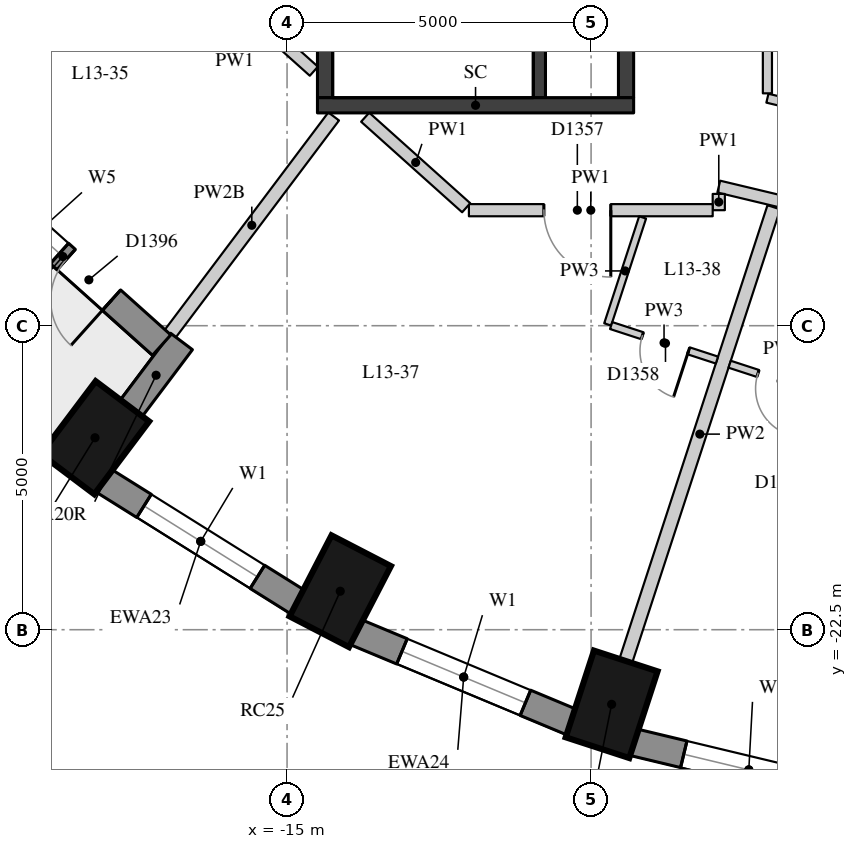
"""IFC4 building model, lengths in metres.
Left out: names, types, materials, properties, quantities, classifications, styles, units other than length and angle.
Written with IfcOpenShell. Run it as: python <this file> out.ifc"""

import sys

from ifc_helpers import new_model, si_unit, direction, frame, frame_2d, origin, origin_2d, place, context, subcontext, project, spatial, rectangle, extrude, element, fill, save


model = new_model("IFC4")
c1 = context("Model", 3, precision=1e-05, world=origin(), true_north=direction((0.0, 1.0)))
c2 = subcontext(c1, "Body", "Model", "MODEL_VIEW")
j1 = project(units=[si_unit("LENGTHUNIT", "METRE"), si_unit("PLANEANGLEUNIT", "RADIAN")], contexts=[c1])
p1 = place(None, origin())
s1 = spatial("IfcSite", under=j1, at=p1, CompositionType="ELEMENT")
p2 = place(p1, origin())
s2 = spatial("IfcBuilding", under=s1, at=p2, CompositionType="ELEMENT")
p3 = place(p2, frame((0.0, 0.0, 51.4)))
s3 = spatial("IfcBuildingStorey", under=s2, at=p3, CompositionType="ELEMENT", Elevation=51.4)
for number, where, z_axis, x_axis in (
    (1, (-18.159, -19.343, 0.0), (0.0, 0.0, 1.0), (-0.601, -0.799, 0.0)),
    (2, (-14.125, -21.867, 0.0), (0.0, 0.0, 1.0), (-0.46, -0.888, 0.0)),
    (3, (-9.662, -23.727, 0.0), (0.0, 0.0, 1.0), (-0.31, -0.951, 0.0)),
):
    element("IfcColumn", number, at=place(p3, frame(where, z_axis=z_axis, x_axis=x_axis)), inside=s3, PredefinedType="COLUMN", context=c2, shape_type="SweptSolid", body=[
        extrude(rectangle(XDim=1.5, YDim=1.1, at=origin_2d()), origin(), (0.0, 0.0, 1.0), 3.3),
    ])
p4 = place(p3, frame((-18.023, -20.044, 0.0), z_axis=(0.0, 0.0, 1.0), x_axis=(0.847635480093, -0.530579016629, 0.0)))
e4 = element("IfcWall", 4, at=p4, inside=s3, PredefinedType="SOLIDWALL", context=c2, shape_type="SweptSolid", body=[
    extrude(rectangle(XDim=3.782, YDim=0.45, at=frame_2d((1.891, 0.0))), origin(), (0.0, 0.0, 1.0), 3.02),
])
p5 = place(p4, frame((0.791, 0.0, 0.4)))
e5 = element("IfcOpeningElement", 5, at=p5, cuts=e4, PredefinedType="OPENING", context=c2, shape_type="SweptSolid", body=[
    extrude(rectangle(XDim=2.2, YDim=1.75, at=frame_2d((1.1, 0.875))), frame((0.0, 0.235, 0.0), z_axis=(0.0, -1.0, 0.0), x_axis=(1.0, 0.0, 0.0)), (0.0, 0.0, 1.0), 0.47),
])
p6 = place(p3, frame((-13.875, -22.537, 0.0), z_axis=(0.0, 0.0, 1.0), x_axis=(0.923031964282, -0.384723267966, 0.0)))
e6 = element("IfcWall", 6, at=p6, inside=s3, PredefinedType="SOLIDWALL", context=c2, shape_type="SweptSolid", body=[
    extrude(rectangle(XDim=3.856, YDim=0.45, at=frame_2d((1.928, 0.0))), origin(), (0.0, 0.0, 1.0), 3.02),
])
p7 = place(p6, frame((0.828, 0.0, 0.4)))
e7 = element("IfcOpeningElement", 7, at=p7, cuts=e6, PredefinedType="OPENING", context=c2, shape_type="SweptSolid", body=[
    extrude(rectangle(XDim=2.2, YDim=1.75, at=frame_2d((1.1, 0.875))), frame((0.0, 0.235, 0.0), z_axis=(0.0, -1.0, 0.0), x_axis=(1.0, 0.0, 0.0)), (0.0, 0.0, 1.0), 0.47),
])
p8 = place(p3, frame((-9.308, -24.35, 0.0), z_axis=(0.0, 0.0, 1.0), x_axis=(0.972496561493, -0.232917233979, 0.0)))
e8 = element("IfcWall", 8, at=p8, inside=s3, PredefinedType="SOLIDWALL", context=c2, shape_type="SweptSolid", body=[
    extrude(rectangle(XDim=3.911, YDim=0.45, at=frame_2d((1.956, 0.0))), origin(), (0.0, 0.0, 1.0), 3.02),
])
p9 = place(p8, frame((0.855, 0.0, 0.4)))
e9 = element("IfcOpeningElement", 9, at=p9, cuts=e8, PredefinedType="OPENING", context=c2, shape_type="SweptSolid", body=[
    extrude(rectangle(XDim=2.2, YDim=1.75, at=frame_2d((1.1, 0.875))), frame((0.0, 0.235, 0.0), z_axis=(0.0, -1.0, 0.0), x_axis=(1.0, 0.0, 0.0)), (0.0, 0.0, 1.0), 0.47),
])
p10 = place(p3, frame((-17.572, -18.871, 0.0), z_axis=(0.0, 0.0, 1.0), x_axis=(0.601262851241, 0.799051302306, 0.0)))
e10 = element("IfcWall", 10, at=p10, inside=s3, PredefinedType="SOLIDWALL", context=c2, shape_type="SweptSolid", body=[
    extrude(rectangle(XDim=1.391, YDim=0.45, at=frame_2d((0.696, 0.0))), origin(), (0.0, 0.0, 1.0), 2.57),
])
p11 = place(p3, frame((-20.313, -14.905, 0.0), z_axis=(0.0, 0.0, 1.0), x_axis=(0.744616407434, -0.667492626012, 0.0)))
e11 = element("IfcWall", 11, at=p11, inside=s3, PredefinedType="SOLIDWALL", context=c2, shape_type="SweptSolid", body=[
    extrude(rectangle(XDim=4.365, YDim=0.45, at=frame_2d((2.183, 0.0))), origin(), (0.0, 0.0, 1.0), 3.02),
])
p12 = place(p11, frame((1.108, 0.0, 0.4)))
e12 = element("IfcOpeningElement", 12, at=p12, cuts=e11, PredefinedType="OPENING", context=c2, shape_type="SweptSolid", body=[
    extrude(rectangle(XDim=1.0, YDim=1.75, at=frame_2d((0.5, 0.875))), frame((0.0, 0.235, 0.0), z_axis=(0.0, -1.0, 0.0), x_axis=(1.0, 0.0, 0.0)), (0.0, 0.0, 1.0), 0.47),
])
p13 = place(p11, frame((2.258, 0.0, 0.0)))
e13 = element("IfcOpeningElement", 13, at=p13, cuts=e11, PredefinedType="OPENING", context=c2, shape_type="SweptSolid", body=[
    extrude(rectangle(XDim=1.0, YDim=2.15, at=frame_2d((0.5, 1.075))), frame((0.0, 0.235, 0.0), z_axis=(0.0, -1.0, 0.0), x_axis=(1.0, 0.0, 0.0)), (0.0, 0.0, 1.0), 0.47),
])
p14 = place(p3, frame((-10.85, -13.75, 0.0), z_axis=(0.0, 0.0, 1.0), x_axis=(0.0, 1.0, 0.0)))
e14 = element("IfcWall", 14, at=p14, inside=s3, PredefinedType="SHEAR", context=c2, shape_type="SweptSolid", body=[
    extrude(rectangle(XDim=6.0, YDim=0.2, at=frame_2d((3.0, 0.0))), origin(), (0.0, 0.0, 1.0), 3.02),
])
p15 = place(p14, frame((4.4, 0.0, 0.0)))
e15 = element("IfcOpeningElement", 15, at=p15, cuts=e14, PredefinedType="OPENING", context=c2, shape_type="SweptSolid", body=[
    extrude(rectangle(XDim=1.5, YDim=2.1, at=frame_2d((0.75, 1.05))), frame((0.0, 0.11, 0.0), z_axis=(0.0, -1.0, 0.0), x_axis=(1.0, 0.0, 0.0)), (0.0, 0.0, 1.0), 0.22),
])
p16 = place(p3, frame((-14.375, -13.75, -0.28), z_axis=(0.0, 0.0, 1.0), x_axis=(0.0, 1.0, 0.0)))
e16 = element("IfcWall", 16, at=p16, inside=s3, PredefinedType="SHEAR", context=c2, shape_type="SweptSolid", body=[
    extrude(rectangle(XDim=6.0, YDim=0.25, at=frame_2d((3.0, 0.0))), origin(), (0.0, 0.0, 1.0), 3.3),
])
p17 = place(p3, frame((-9.425, -13.75, -0.28), z_axis=(0.0, 0.0, 1.0), x_axis=(0.0, 1.0, 0.0)))
e17 = element("IfcWall", 17, at=p17, inside=s3, PredefinedType="SHEAR", context=c2, shape_type="SweptSolid", body=[
    extrude(rectangle(XDim=6.0, YDim=0.25, at=frame_2d((3.0, 0.0))), origin(), (0.0, 0.0, 1.0), 3.3),
])
p18 = place(p17, frame((2.4, 0.0, 0.28)))
e18 = element("IfcOpeningElement", 18, at=p18, cuts=e17, PredefinedType="OPENING", context=c2, shape_type="SweptSolid", body=[
    extrude(rectangle(XDim=1.5, YDim=2.1, at=frame_2d((0.75, 1.05))), frame((0.0, 0.135, 0.0), z_axis=(0.0, -1.0, 0.0), x_axis=(1.0, 0.0, 0.0)), (0.0, 0.0, 1.0), 0.27),
])
p19 = place(p3, frame((-14.5, -13.875, -0.28), z_axis=(0.0, 0.0, 1.0), x_axis=(1.0, 0.0, 0.0)))
e19 = element("IfcWall", 19, at=p19, inside=s3, PredefinedType="SHEAR", context=c2, shape_type="SweptSolid", body=[
    extrude(rectangle(XDim=5.2, YDim=0.25, at=frame_2d((2.6, 0.0))), origin(), (0.0, 0.0, 1.0), 3.3),
])
p20 = place(p3, frame((-14.559, -13.314, 0.0), z_axis=(0.0, 0.0, 1.0), x_axis=(-0.744636171002, 0.667470578254, 0.0)))
e20 = element("IfcWall", 20, at=p20, inside=s3, PredefinedType="PARTITIONING", context=c2, shape_type="SweptSolid", body=[
    extrude(rectangle(XDim=2.069, YDim=0.2, at=frame_2d((1.035, 0.0))), origin(), (0.0, 0.0, 1.0), 3.02),
])
p21 = place(p3, frame((-0.098, -17.077, 0.0), z_axis=(0.0, 0.0, 1.0), x_axis=(-0.972607318404, 0.232454305588, 0.0)))
e21 = element("IfcWall", 21, at=p21, inside=s3, PredefinedType="PARTITIONING", context=c2, shape_type="SweptSolid", body=[
    extrude(rectangle(XDim=8.022, YDim=0.2, at=frame_2d((4.011, 0.0))), origin(), (0.0, 0.0, 1.0), 3.02),
])
p22 = place(p21, frame((1.479, 0.0, 0.0)))
e22 = element("IfcOpeningElement", 22, at=p22, cuts=e21, PredefinedType="OPENING", context=c2, shape_type="SweptSolid", body=[
    extrude(rectangle(XDim=1.1, YDim=2.1, at=frame_2d((0.55, 1.05))), frame((0.0, 0.11, 0.0), z_axis=(0.0, -1.0, 0.0), x_axis=(1.0, 0.0, 0.0)), (0.0, 0.0, 1.0), 0.22),
])
p23 = place(p3, frame((-7.9, -15.332, 0.0), z_axis=(0.0, 0.0, 1.0), x_axis=(0.0, -1.0, 0.0)))
e23 = element("IfcWall", 23, at=p23, inside=s3, PredefinedType="PARTITIONING", context=c2, shape_type="SweptSolid", body=[
    extrude(rectangle(XDim=0.268, YDim=0.2, at=frame_2d((0.134, 0.0))), origin(), (0.0, 0.0, 1.0), 3.02),
])
p24 = place(p3, frame((-8.0, -15.6, 0.0), z_axis=(0.0, 0.0, 1.0), x_axis=(-1.0, 0.0, 0.0)))
e24 = element("IfcWall", 24, at=p24, inside=s3, PredefinedType="PARTITIONING", context=c2, shape_type="SweptSolid", body=[
    extrude(rectangle(XDim=4.009, YDim=0.2, at=frame_2d((2.005, 0.0))), origin(), (0.0, 0.0, 1.0), 3.02),
])
p25 = place(p24, frame((1.676, 0.0, 0.0)))
e25 = element("IfcOpeningElement", 25, at=p25, cuts=e24, PredefinedType="OPENING", context=c2, shape_type="SweptSolid", body=[
    extrude(rectangle(XDim=1.1, YDim=2.1, at=frame_2d((0.55, 1.05))), frame((0.0, 0.11, 0.0), z_axis=(0.0, -1.0, 0.0), x_axis=(1.0, 0.0, 0.0)), (0.0, 0.0, 1.0), 0.22),
])
p26 = place(p3, frame((-12.054, -15.56, 0.0), z_axis=(0.0, 0.0, 1.0), x_axis=(-0.744625700487, 0.66748225907, 0.0)))
e26 = element("IfcWall", 26, at=p26, inside=s3, PredefinedType="PARTITIONING", context=c2, shape_type="SweptSolid", body=[
    extrude(rectangle(XDim=2.231, YDim=0.2, at=frame_2d((1.116, 0.0))), origin(), (0.0, 0.0, 1.0), 3.02),
])
p27 = place(p3, frame((-5.154, -14.224, 0.0), z_axis=(0.0, 0.0, 1.0), x_axis=(-0.97258848944, 0.232533073366, 0.0)))
e27 = element("IfcWall", 27, at=p27, inside=s3, PredefinedType="PARTITIONING", context=c2, shape_type="SweptSolid", body=[
    extrude(rectangle(XDim=2.001, YDim=0.15, at=frame_2d((1.0, 0.0))), origin(), (0.0, 0.0, 1.0), 2.57),
])
p28 = place(p3, frame((-7.1, -13.678, 0.0), z_axis=(0.0, 0.0, 1.0), x_axis=(0.0, 1.0, 0.0)))
e28 = element("IfcWall", 28, at=p28, inside=s3, PredefinedType="PARTITIONING", context=c2, shape_type="SweptSolid", body=[
    extrude(rectangle(XDim=1.928, YDim=0.15, at=frame_2d((0.964, 0.0))), origin(), (0.0, 0.0, 1.0), 3.02),
])
p29 = place(p3, frame((-16.927, -17.638, 0.0), z_axis=(0.0, 0.0, 1.0), x_axis=(0.601158965663, 0.799129462605, 0.0)))
e29 = element("IfcWall", 29, at=p29, inside=s3, PredefinedType="PARTITIONING", context=c2, shape_type="SweptSolid", body=[
    extrude(rectangle(XDim=4.48, YDim=0.22, at=frame_2d((2.24, 0.0))), origin(), (0.0, 0.0, 1.0), 2.57),
])
p30 = place(p3, frame((-9.429, -23.014, 0.0), z_axis=(0.0, 0.0, 1.0), x_axis=(0.310249775859, 0.950655077607, 0.0)))
e30 = element("IfcWall", 30, at=p30, inside=s3, PredefinedType="PARTITIONING", context=c2, shape_type="SweptSolid", body=[
    extrude(rectangle(XDim=7.85, YDim=0.22, at=frame_2d((3.925, 0.0))), origin(), (0.0, 0.0, 1.0), 3.02),
])
p31 = place(p3, frame((-9.153, -15.719, 0.0), z_axis=(0.0, 0.0, 1.0), x_axis=(-0.310326382186, -0.950630073435, 0.0)))
e31 = element("IfcWall", 31, at=p31, inside=s3, PredefinedType="PARTITIONING", context=c2, shape_type="SweptSolid", body=[
    extrude(rectangle(XDim=1.851, YDim=0.12, at=frame_2d((0.926, 0.0))), origin(), (0.0, 0.0, 1.0), 3.02),
])
p32 = place(p3, frame((-9.67, -17.498, 0.0), z_axis=(0.0, 0.0, 1.0), x_axis=(0.950678536911, -0.31017788357, 0.0)))
e32 = element("IfcWall", 32, at=p32, inside=s3, PredefinedType="PARTITIONING", context=c2, shape_type="SweptSolid", body=[
    extrude(rectangle(XDim=1.83, YDim=0.12, at=frame_2d((0.915, 0.0))), origin(), (0.0, 0.0, 1.0), 3.02),
])
p33 = place(p32, frame((0.54, 0.0, 0.0)))
e33 = element("IfcOpeningElement", 33, at=p33, cuts=e32, PredefinedType="OPENING", context=c2, shape_type="SweptSolid", body=[
    extrude(rectangle(XDim=0.8, YDim=2.1, at=frame_2d((0.4, 1.05))), frame((0.0, 0.07, 0.0), z_axis=(0.0, -1.0, 0.0), x_axis=(1.0, 0.0, 0.0)), (0.0, 0.0, 1.0), 0.14),
])
p34 = place(p3, frame((-5.981, -18.701, 0.0), z_axis=(0.0, 0.0, 1.0), x_axis=(-0.950639191072, 0.310298450524, 0.0)))
e34 = element("IfcWall", 34, at=p34, inside=s3, PredefinedType="PARTITIONING", context=c2, shape_type="SweptSolid", body=[
    extrude(rectangle(XDim=1.83, YDim=0.12, at=frame_2d((0.915, 0.0))), origin(), (0.0, 0.0, 1.0), 3.02),
])
p35 = place(p34, frame((0.54, 0.0, 0.0)))
e35 = element("IfcOpeningElement", 35, at=p35, cuts=e34, PredefinedType="OPENING", context=c2, shape_type="SweptSolid", body=[
    extrude(rectangle(XDim=0.8, YDim=2.1, at=frame_2d((0.4, 1.05))), frame((0.0, 0.07, 0.0), z_axis=(0.0, -1.0, 0.0), x_axis=(1.0, 0.0, 0.0)), (0.0, 0.0, 1.0), 0.14),
])
p36 = place(p5, origin())
e36 = element("IfcWindow", 36, at=p36, inside=s3, PartitioningType="SINGLE_PANEL", PredefinedType="WINDOW", context=c2, shape_type="SweptSolid", body=[
    extrude(rectangle(XDim=2.2, YDim=1.75, at=frame_2d((1.1, 0.875))), frame((0.0, 0.035, 0.0), z_axis=(0.0, -1.0, 0.0), x_axis=(1.0, 0.0, 0.0)), (0.0, 0.0, 1.0), 0.06),
])
fill(e5, e36)
p37 = place(p7, origin())
e37 = element("IfcWindow", 37, at=p37, inside=s3, PartitioningType="SINGLE_PANEL", PredefinedType="WINDOW", context=c2, shape_type="SweptSolid", body=[
    extrude(rectangle(XDim=2.2, YDim=1.75, at=frame_2d((1.1, 0.875))), frame((0.0, 0.035, 0.0), z_axis=(0.0, -1.0, 0.0), x_axis=(1.0, 0.0, 0.0)), (0.0, 0.0, 1.0), 0.06),
])
fill(e7, e37)
p38 = place(p9, origin())
e38 = element("IfcWindow", 38, at=p38, inside=s3, PartitioningType="SINGLE_PANEL", PredefinedType="WINDOW", context=c2, shape_type="SweptSolid", body=[
    extrude(rectangle(XDim=2.2, YDim=1.75, at=frame_2d((1.1, 0.875))), frame((0.0, 0.035, 0.0), z_axis=(0.0, -1.0, 0.0), x_axis=(1.0, 0.0, 0.0)), (0.0, 0.0, 1.0), 0.06),
])
fill(e9, e38)
p39 = place(p12, origin())
e39 = element("IfcWindow", 39, at=p39, inside=s3, PartitioningType="SINGLE_PANEL", PredefinedType="WINDOW", context=c2, shape_type="SweptSolid", body=[
    extrude(rectangle(XDim=1.0, YDim=1.75, at=frame_2d((0.5, 0.875))), frame((0.0, 0.035, 0.0), z_axis=(0.0, -1.0, 0.0), x_axis=(1.0, 0.0, 0.0)), (0.0, 0.0, 1.0), 0.06),
])
fill(e12, e39)
p40 = place(p13, frame((1.0, 0.0, 0.0), z_axis=(0.0, 0.0, 1.0), x_axis=(-1.0, 0.0, 0.0)))
e40 = element("IfcDoor", 40, at=p40, inside=s3, OperationType="SINGLE_SWING_LEFT", PredefinedType="DOOR", context=c2, shape_type="SweptSolid", body=[
    extrude(rectangle(XDim=1.0, YDim=2.15, at=frame_2d((0.5, 1.075))), frame((0.0, 0.075, 0.0), z_axis=(0.0, -1.0, 0.0), x_axis=(1.0, 0.0, 0.0)), (0.0, 0.0, 1.0), 0.05),
])
fill(e13, e40)
p41 = place(p25, origin())
e41 = element("IfcDoor", 41, at=p41, inside=s3, OperationType="SINGLE_SWING_LEFT", PredefinedType="DOOR", context=c2, shape_type="SweptSolid", body=[
    extrude(rectangle(XDim=1.1, YDim=2.1, at=frame_2d((0.55, 1.05))), frame((0.0, 0.025, 0.0), z_axis=(0.0, -1.0, 0.0), x_axis=(1.0, 0.0, 0.0)), (0.0, 0.0, 1.0), 0.05),
])
fill(e25, e41)
p42 = place(p33, origin())
e42 = element("IfcDoor", 42, at=p42, inside=s3, OperationType="SINGLE_SWING_LEFT", PredefinedType="DOOR", context=c2, shape_type="SweptSolid", body=[
    extrude(rectangle(XDim=0.8, YDim=2.1, at=frame_2d((0.4, 1.05))), frame((0.0, 0.025, 0.0), z_axis=(0.0, -1.0, 0.0), x_axis=(1.0, 0.0, 0.0)), (0.0, 0.0, 1.0), 0.05),
])
fill(e33, e42)
p43 = place(p35, origin())
e43 = element("IfcDoor", 43, at=p43, inside=s3, OperationType="SINGLE_SWING_LEFT", PredefinedType="DOOR", context=c2, shape_type="SweptSolid", body=[
    extrude(rectangle(XDim=0.8, YDim=2.1, at=frame_2d((0.4, 1.05))), frame((0.0, 0.025, 0.0), z_axis=(0.0, -1.0, 0.0), x_axis=(1.0, 0.0, 0.0)), (0.0, 0.0, 1.0), 0.05),
])
fill(e35, e43)
save(model, sys.argv[1])
